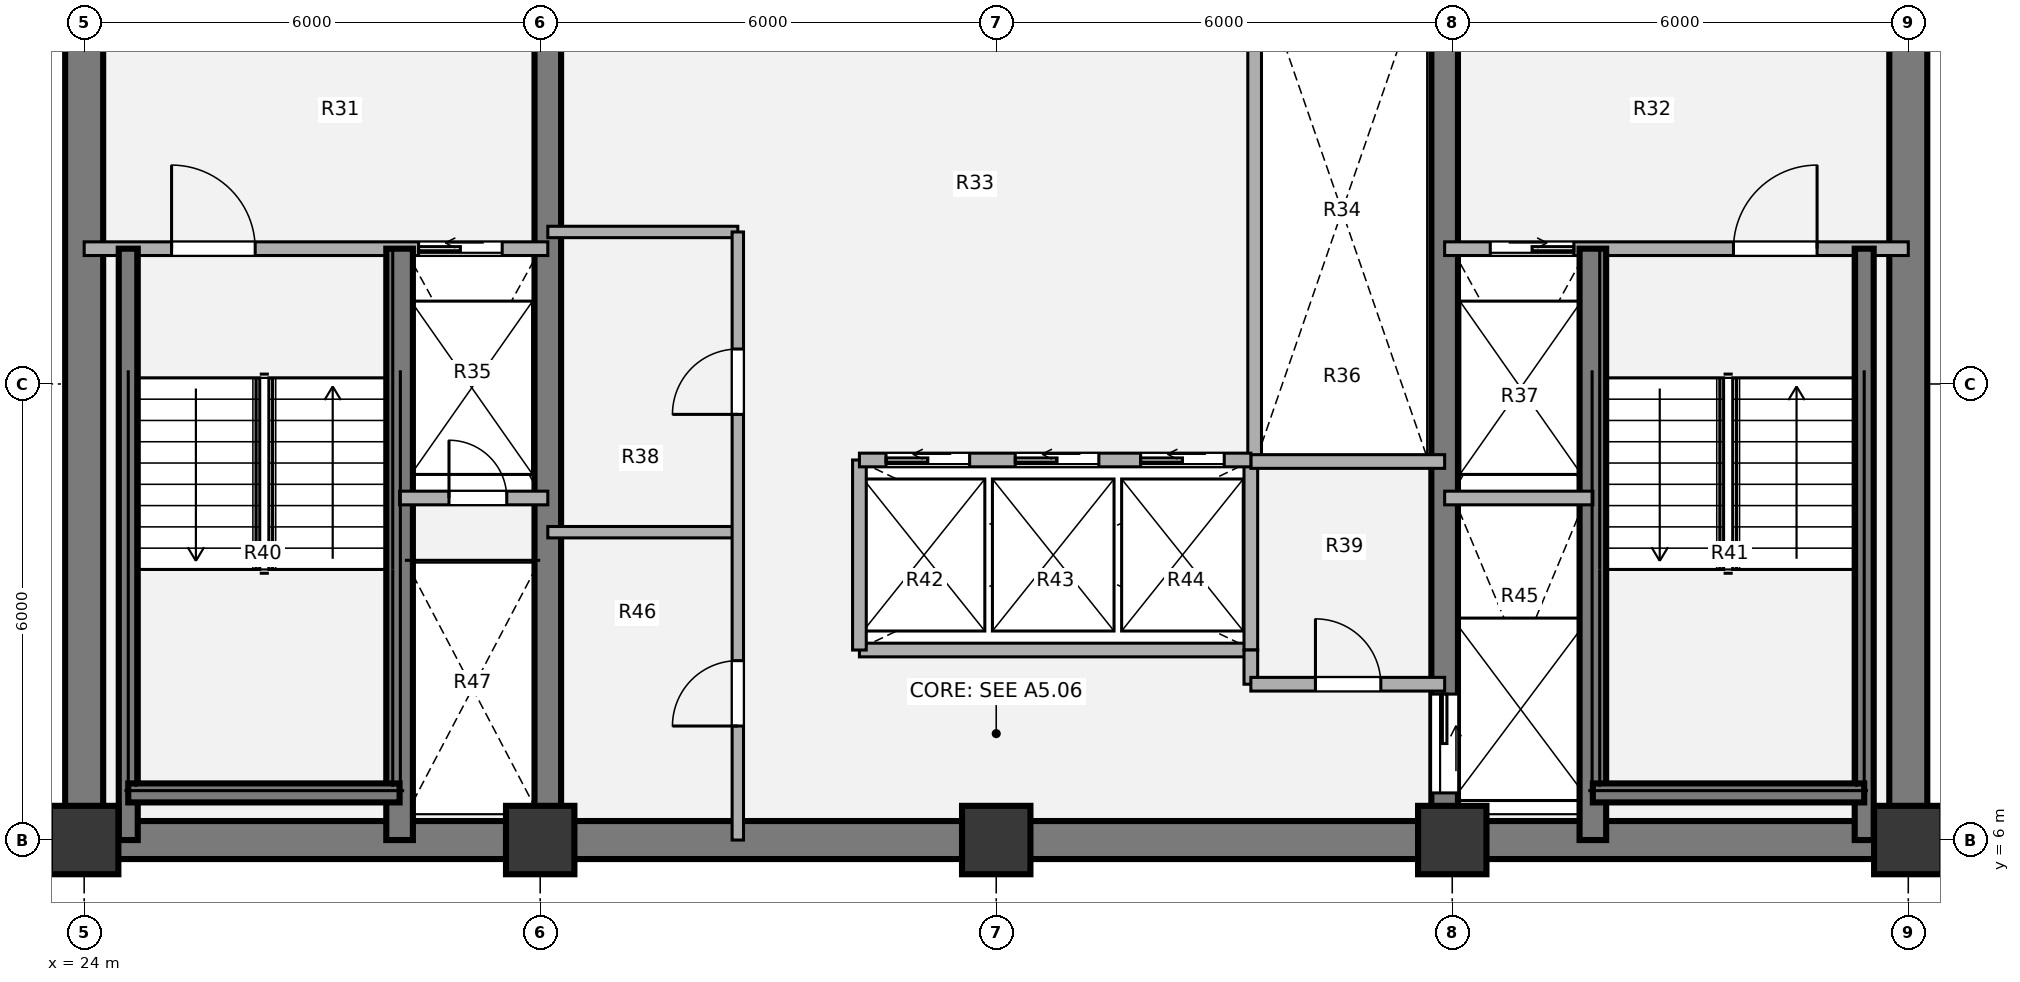
"""IFC4 building model, lengths in metres.
Left out: names, types, materials, properties, quantities, classifications, styles, units other than length and angle.
Written with IfcOpenShell. Run it as: python <this file> out.ifc"""

import sys

from ifc_helpers import new_model, si_unit, direction, frame, frame_2d, origin, origin_2d, place, context, subcontext, project, spatial, rectangle, extrude, source, transform, mapped, element, fill, save


model = new_model("IFC4")
c1 = context("Model", 3, precision=1e-05, world=origin(), true_north=direction((0.0, 1.0)))
c2 = subcontext(c1, "Body", "Model", "MODEL_VIEW")
j1 = project(units=[si_unit("LENGTHUNIT", "METRE"), si_unit("PLANEANGLEUNIT", "RADIAN")], contexts=[c1])
p1 = place(None, origin())
s1 = spatial("IfcSite", under=j1, at=p1, CompositionType="ELEMENT")
p2 = place(p1, origin())
s2 = spatial("IfcBuilding", under=s1, at=p2, CompositionType="ELEMENT")
p3 = place(p2, frame((0.0, 0.0, 131.4)))
s3 = spatial("IfcBuildingStorey", under=s2, at=p3, CompositionType="ELEMENT", Elevation=131.4)
m1 = source(origin(), c2, "Body", "SweptSolid", [
    extrude(rectangle(XDim=0.9, YDim=0.9, at=origin_2d()), origin(), (0.0, 0.0, 1.0), 3.78),
])
for number, where, z_axis, x_axis in (
    (1, (24.0, 6.0, 0.0), (0.0, 0.0, 1.0), (1.0, 0.0, 0.0)),
    (2, (30.0, 6.0, 0.0), (0.0, 0.0, 1.0), (1.0, 0.0, 0.0)),
    (3, (36.0, 6.0, 0.0), (0.0, 0.0, 1.0), (1.0, 0.0, 0.0)),
    (4, (42.0, 6.0, 0.0), (0.0, 0.0, 1.0), (1.0, 0.0, 0.0)),
    (5, (48.0, 6.0, 0.0), (0.0, 0.0, 1.0), (1.0, 0.0, 0.0)),
):
    element("IfcColumn", number, at=place(p3, frame(where, z_axis=z_axis, x_axis=x_axis)), inside=s3, PredefinedType="COLUMN", context=c2, shape_type="MappedRepresentation", body=[
        mapped(m1, transform((0.0, 0.0, 0.0), x_axis=(1.0, 0.0, 0.0), y_axis=(0.0, 1.0, 0.0), z_axis=(0.0, 0.0, 1.0), scale=1.0)),
    ])
p4 = place(p3, frame((48.25, 6.0, 0.0), z_axis=(0.0, 0.0, 1.0), x_axis=(-1.0, 0.0, 0.0)))
e6 = element("IfcWall", 6, at=p4, inside=s3, PredefinedType="SHEAR", context=c2, shape_type="SweptSolid", body=[
    extrude(rectangle(XDim=24.5, YDim=0.5, at=frame_2d((12.25, 0.0))), origin(), (0.0, 0.0, 1.0), 3.78),
])
for number, where, z_axis, x_axis in (
    (7, (24.0, 6.0, 0.0), (0.0, 0.0, 1.0), (0.0, 1.0, 0.0)),
    (8, (48.0, 18.0, 0.0), (0.0, 0.0, 1.0), (0.0, -1.0, 0.0)),
):
    element("IfcWall", number, at=place(p3, frame(where, z_axis=z_axis, x_axis=x_axis)), inside=s3, PredefinedType="SHEAR", context=c2, shape_type="SweptSolid", body=[
        extrude(rectangle(XDim=12.0, YDim=0.5, at=frame_2d((6.0, 0.0))), origin(), (0.0, 0.0, 1.0), 3.78),
    ])
p5 = place(p3, frame((30.1, 6.0, 0.0), z_axis=(0.0, 0.0, 1.0), x_axis=(0.0, 1.0, 0.0)))
e9 = element("IfcWall", 9, at=p5, inside=s3, PredefinedType="SHEAR", context=c2, shape_type="SweptSolid", body=[
    extrude(rectangle(XDim=12.0, YDim=0.35, at=frame_2d((6.0, 0.0))), origin(), (0.0, 0.0, 1.0), 3.78),
])
p6 = place(p3, frame((41.9, 18.0, 0.0), z_axis=(0.0, 0.0, 1.0), x_axis=(0.0, -1.0, 0.0)))
e10 = element("IfcWall", 10, at=p6, inside=s3, PredefinedType="SHEAR", context=c2, shape_type="SweptSolid", body=[
    extrude(rectangle(XDim=12.0, YDim=0.35, at=frame_2d((6.0, 0.0))), origin(), (0.0, 0.0, 1.0), 3.78),
])
p7 = place(p6, frame((10.08, 0.0, 0.0)))
e11 = element("IfcOpeningElement", 11, at=p7, cuts=e10, PredefinedType="OPENING", context=c2, shape_type="SweptSolid", body=[
    extrude(rectangle(XDim=1.3, YDim=2.1, at=origin_2d()), frame((0.65, 0.185, 1.05), z_axis=(0.0, -1.0, 0.0), x_axis=(1.0, 0.0, 0.0)), (0.0, 0.0, 1.0), 0.37),
])
p8 = place(p3, frame((30.1, 14.0, 0.0), z_axis=(0.0, 0.0, 1.0), x_axis=(1.0, 0.0, 0.0)))
e12 = element("IfcWall", 12, at=p8, inside=s3, PredefinedType="PARTITIONING", context=c2, shape_type="SweptSolid", body=[
    extrude(rectangle(XDim=2.5, YDim=0.15, at=frame_2d((1.25, 0.0))), origin(), (0.0, 0.0, 1.0), 3.5),
])
p9 = place(p3, frame((34.2, 8.5, 0.0), z_axis=(0.0, 0.0, 1.0), x_axis=(1.0, 0.0, 0.0)))
e13 = element("IfcWall", 13, at=p9, inside=s3, PredefinedType="PARTITIONING", context=c2, shape_type="SweptSolid", body=[
    extrude(rectangle(XDim=5.15, YDim=0.18, at=frame_2d((2.575, 0.0))), origin(), (0.0, 0.0, 1.0), 3.5),
])
for number, where, z_axis, x_axis in (
    (14, (34.2, 8.5, 0.0), (0.0, 0.0, 1.0), (0.0, 1.0, 0.0)),
    (15, (39.35, 8.5, 0.0), (0.0, 0.0, 1.0), (0.0, 1.0, 0.0)),
):
    element("IfcWall", number, at=place(p3, frame(where, z_axis=z_axis, x_axis=x_axis)), inside=s3, PredefinedType="PARTITIONING", context=c2, shape_type="SweptSolid", body=[
        extrude(rectangle(XDim=2.5, YDim=0.18, at=frame_2d((1.25, 0.0))), origin(), (0.0, 0.0, 1.0), 3.5),
    ])
p10 = place(p3, frame((39.4, 11.0, 0.0), z_axis=(0.0, 0.0, 1.0), x_axis=(0.0, 1.0, 0.0)))
e16 = element("IfcWall", 16, at=p10, inside=s3, PredefinedType="PARTITIONING", context=c2, shape_type="SweptSolid", body=[
    extrude(rectangle(XDim=7.0, YDim=0.18, at=frame_2d((3.5, 0.0))), origin(), (0.0, 0.0, 1.0), 3.5),
])
p11 = place(p3, frame((30.1, 10.05, 0.0), z_axis=(0.0, 0.0, 1.0), x_axis=(1.0, 0.0, 0.0)))
e17 = element("IfcWall", 17, at=p11, inside=s3, PredefinedType="PARTITIONING", context=c2, shape_type="SweptSolid", body=[
    extrude(rectangle(XDim=2.5, YDim=0.15, at=frame_2d((1.25, 0.0))), origin(), (0.0, 0.0, 1.0), 3.5),
])
p12 = place(p3, frame((32.6, 6.0, 0.0), z_axis=(0.0, 0.0, 1.0), x_axis=(0.0, 1.0, 0.0)))
e18 = element("IfcWall", 18, at=p12, inside=s3, PredefinedType="PARTITIONING", context=c2, shape_type="SweptSolid", body=[
    extrude(rectangle(XDim=8.0, YDim=0.15, at=frame_2d((4.0, 0.0))), origin(), (0.0, 0.0, 1.0), 3.5),
])
p13 = place(p12, frame((1.5, 0.0, 0.0)))
e19 = element("IfcOpeningElement", 19, at=p13, cuts=e18, PredefinedType="OPENING", context=c2, shape_type="SweptSolid", body=[
    extrude(rectangle(XDim=0.86, YDim=2.1, at=origin_2d()), frame((0.43, 0.085, 1.05), z_axis=(0.0, -1.0, 0.0), x_axis=(1.0, 0.0, 0.0)), (0.0, 0.0, 1.0), 0.17),
])
p14 = place(p12, frame((5.6, 0.0, 0.0)))
e20 = element("IfcOpeningElement", 20, at=p14, cuts=e18, PredefinedType="OPENING", context=c2, shape_type="SweptSolid", body=[
    extrude(rectangle(XDim=0.86, YDim=2.1, at=origin_2d()), frame((0.43, 0.085, 1.05), z_axis=(0.0, -1.0, 0.0), x_axis=(1.0, 0.0, 0.0)), (0.0, 0.0, 1.0), 0.17),
])
p15 = place(p3, frame((39.35, 10.98, 0.0), z_axis=(0.0, 0.0, 1.0), x_axis=(1.0, 0.0, 0.0)))
e21 = element("IfcWall", 21, at=p15, inside=s3, PredefinedType="PARTITIONING", context=c2, shape_type="SweptSolid", body=[
    extrude(rectangle(XDim=2.55, YDim=0.18, at=frame_2d((1.275, 0.0))), origin(), (0.0, 0.0, 1.0), 3.5),
])
p16 = place(p3, frame((39.35, 8.05, 0.0), z_axis=(0.0, 0.0, 1.0), x_axis=(0.0, 1.0, 0.0)))
e22 = element("IfcWall", 22, at=p16, inside=s3, PredefinedType="PARTITIONING", context=c2, shape_type="SweptSolid", body=[
    extrude(rectangle(XDim=0.45, YDim=0.18, at=frame_2d((0.225, 0.0))), origin(), (0.0, 0.0, 1.0), 3.5),
])
p17 = place(p3, frame((39.35, 8.05, 0.0), z_axis=(0.0, 0.0, 1.0), x_axis=(1.0, 0.0, 0.0)))
e23 = element("IfcWall", 23, at=p17, inside=s3, PredefinedType="PARTITIONING", context=c2, shape_type="SweptSolid", body=[
    extrude(rectangle(XDim=2.55, YDim=0.18, at=frame_2d((1.275, 0.0))), origin(), (0.0, 0.0, 1.0), 3.5),
])
p18 = place(p17, frame((0.85, 0.0, 0.0)))
e24 = element("IfcOpeningElement", 24, at=p18, cuts=e23, PredefinedType="OPENING", context=c2, shape_type="SweptSolid", body=[
    extrude(rectangle(XDim=0.86, YDim=2.1, at=origin_2d()), frame((0.43, 0.1, 1.05), z_axis=(0.0, -1.0, 0.0), x_axis=(1.0, 0.0, 0.0)), (0.0, 0.0, 1.0), 0.2),
])
p19 = place(p3, frame((24.0, 13.78, 0.0), z_axis=(0.0, 0.0, 1.0), x_axis=(1.0, 0.0, 0.0)))
e25 = element("IfcWall", 25, at=p19, inside=s3, PredefinedType="PARTITIONING", context=c2, shape_type="SweptSolid", body=[
    extrude(rectangle(XDim=6.1, YDim=0.18, at=frame_2d((3.05, 0.0))), origin(), (0.0, 0.0, 1.0), 3.5),
])
p20 = place(p19, frame((1.15, 0.0, 0.0)))
e26 = element("IfcOpeningElement", 26, at=p20, cuts=e25, PredefinedType="OPENING", context=c2, shape_type="SweptSolid", body=[
    extrude(rectangle(XDim=1.1, YDim=2.1, at=origin_2d()), frame((0.55, 0.1, 1.05), z_axis=(0.0, -1.0, 0.0), x_axis=(1.0, 0.0, 0.0)), (0.0, 0.0, 1.0), 0.2),
])
p21 = place(p19, frame((4.4, 0.0, 0.0)))
e27 = element("IfcOpeningElement", 27, at=p21, cuts=e25, PredefinedType="OPENING", context=c2, shape_type="SweptSolid", body=[
    extrude(rectangle(XDim=1.1, YDim=2.1, at=origin_2d()), frame((0.55, 0.1, 1.05), z_axis=(0.0, -1.0, 0.0), x_axis=(1.0, 0.0, 0.0)), (0.0, 0.0, 1.0), 0.2),
])
p22 = place(p3, frame((28.15, 6.0, 0.0), z_axis=(0.0, 0.0, 1.0), x_axis=(0.0, 1.0, 0.0)))
e28 = element("IfcWall", 28, at=p22, inside=s3, PredefinedType="SHEAR", context=c2, shape_type="SweptSolid", body=[
    extrude(rectangle(XDim=7.78, YDim=0.35, at=frame_2d((3.89, 0.0))), origin(), (0.0, 0.0, 1.0), 3.85),
])
p23 = place(p3, frame((24.58, 6.0, 0.0), z_axis=(0.0, 0.0, 1.0), x_axis=(0.0, 1.0, 0.0)))
e29 = element("IfcWall", 29, at=p23, inside=s3, PredefinedType="SHEAR", context=c2, shape_type="SweptSolid", body=[
    extrude(rectangle(XDim=7.78, YDim=0.25, at=frame_2d((3.89, 0.0))), origin(), (0.0, 0.0, 1.0), 3.85),
])
p24 = place(p3, frame((24.58, 6.62, 0.0), z_axis=(0.0, 0.0, 1.0), x_axis=(1.0, 0.0, 0.0)))
e30 = element("IfcWall", 30, at=p24, inside=s3, PredefinedType="SHEAR", context=c2, shape_type="SweptSolid", body=[
    extrude(rectangle(XDim=3.57, YDim=0.25, at=frame_2d((1.785, 0.0))), origin(), (0.0, 0.0, 1.0), 3.85),
])
p25 = place(p3, frame((28.15, 10.5, 0.0), z_axis=(0.0, 0.0, 1.0), x_axis=(1.0, 0.0, 0.0)))
e31 = element("IfcWall", 31, at=p25, inside=s3, PredefinedType="PARTITIONING", context=c2, shape_type="SweptSolid", body=[
    extrude(rectangle(XDim=1.95, YDim=0.18, at=frame_2d((0.975, 0.0))), origin(), (0.0, 0.0, 1.0), 3.5),
])
p26 = place(p25, frame((0.65, 0.0, 0.0)))
e32 = element("IfcOpeningElement", 32, at=p26, cuts=e31, PredefinedType="OPENING", context=c2, shape_type="SweptSolid", body=[
    extrude(rectangle(XDim=0.76, YDim=2.05, at=origin_2d()), frame((0.38, 0.1, 1.025), z_axis=(0.0, -1.0, 0.0), x_axis=(1.0, 0.0, 0.0)), (0.0, 0.0, 1.0), 0.2),
])
p27 = place(p3, frame((41.9, 13.78, 0.0), z_axis=(0.0, 0.0, 1.0), x_axis=(1.0, 0.0, 0.0)))
e33 = element("IfcWall", 33, at=p27, inside=s3, PredefinedType="PARTITIONING", context=c2, shape_type="SweptSolid", body=[
    extrude(rectangle(XDim=6.1, YDim=0.18, at=frame_2d((3.05, 0.0))), origin(), (0.0, 0.0, 1.0), 3.5),
])
p28 = place(p27, frame((0.6, 0.0, 0.0)))
e34 = element("IfcOpeningElement", 34, at=p28, cuts=e33, PredefinedType="OPENING", context=c2, shape_type="SweptSolid", body=[
    extrude(rectangle(XDim=1.1, YDim=2.1, at=origin_2d()), frame((0.55, 0.1, 1.05), z_axis=(0.0, -1.0, 0.0), x_axis=(1.0, 0.0, 0.0)), (0.0, 0.0, 1.0), 0.2),
])
p29 = place(p27, frame((3.8, 0.0, 0.0)))
e35 = element("IfcOpeningElement", 35, at=p29, cuts=e33, PredefinedType="OPENING", context=c2, shape_type="SweptSolid", body=[
    extrude(rectangle(XDim=1.1, YDim=2.1, at=origin_2d()), frame((0.55, 0.1, 1.05), z_axis=(0.0, -1.0, 0.0), x_axis=(1.0, 0.0, 0.0)), (0.0, 0.0, 1.0), 0.2),
])
p30 = place(p3, frame((43.85, 6.0, 0.0), z_axis=(0.0, 0.0, 1.0), x_axis=(0.0, 1.0, 0.0)))
e36 = element("IfcWall", 36, at=p30, inside=s3, PredefinedType="SHEAR", context=c2, shape_type="SweptSolid", body=[
    extrude(rectangle(XDim=7.78, YDim=0.35, at=frame_2d((3.89, 0.0))), origin(), (0.0, 0.0, 1.0), 3.85),
])
p31 = place(p3, frame((47.42, 6.0, 0.0), z_axis=(0.0, 0.0, 1.0), x_axis=(0.0, 1.0, 0.0)))
e37 = element("IfcWall", 37, at=p31, inside=s3, PredefinedType="SHEAR", context=c2, shape_type="SweptSolid", body=[
    extrude(rectangle(XDim=7.78, YDim=0.25, at=frame_2d((3.89, 0.0))), origin(), (0.0, 0.0, 1.0), 3.85),
])
p32 = place(p3, frame((43.85, 6.62, 0.0), z_axis=(0.0, 0.0, 1.0), x_axis=(1.0, 0.0, 0.0)))
e38 = element("IfcWall", 38, at=p32, inside=s3, PredefinedType="SHEAR", context=c2, shape_type="SweptSolid", body=[
    extrude(rectangle(XDim=3.57, YDim=0.25, at=frame_2d((1.785, 0.0))), origin(), (0.0, 0.0, 1.0), 3.85),
])
p33 = place(p3, frame((41.9, 10.5, 0.0), z_axis=(0.0, 0.0, 1.0), x_axis=(1.0, 0.0, 0.0)))
e39 = element("IfcWall", 39, at=p33, inside=s3, PredefinedType="PARTITIONING", context=c2, shape_type="SweptSolid", body=[
    extrude(rectangle(XDim=1.95, YDim=0.18, at=frame_2d((0.975, 0.0))), origin(), (0.0, 0.0, 1.0), 3.5),
])
p34 = place(p3, frame((34.2, 11.0, 0.0), z_axis=(0.0, 0.0, 1.0), x_axis=(1.0, 0.0, 0.0)))
e40 = element("IfcWall", 40, at=p34, inside=s3, PredefinedType="PARTITIONING", context=c2, shape_type="SweptSolid", body=[
    extrude(rectangle(XDim=5.15, YDim=0.18, at=frame_2d((2.575, 0.0))), origin(), (0.0, 0.0, 1.0), 3.5),
])
p35 = place(p34, frame((0.35, 0.0, 0.0)))
e41 = element("IfcOpeningElement", 41, at=p35, cuts=e40, PredefinedType="OPENING", context=c2, shape_type="SweptSolid", body=[
    extrude(rectangle(XDim=1.1, YDim=2.1, at=origin_2d()), frame((0.55, 0.1, 1.05), z_axis=(0.0, -1.0, 0.0), x_axis=(1.0, 0.0, 0.0)), (0.0, 0.0, 1.0), 0.2),
])
p36 = place(p34, frame((2.05, 0.0, 0.0)))
e42 = element("IfcOpeningElement", 42, at=p36, cuts=e40, PredefinedType="OPENING", context=c2, shape_type="SweptSolid", body=[
    extrude(rectangle(XDim=1.1, YDim=2.1, at=origin_2d()), frame((0.55, 0.1, 1.05), z_axis=(0.0, -1.0, 0.0), x_axis=(1.0, 0.0, 0.0)), (0.0, 0.0, 1.0), 0.2),
])
p37 = place(p34, frame((3.7, 0.0, 0.0)))
e43 = element("IfcOpeningElement", 43, at=p37, cuts=e40, PredefinedType="OPENING", context=c2, shape_type="SweptSolid", body=[
    extrude(rectangle(XDim=1.1, YDim=2.1, at=origin_2d()), frame((0.55, 0.1, 1.05), z_axis=(0.0, -1.0, 0.0), x_axis=(1.0, 0.0, 0.0)), (0.0, 0.0, 1.0), 0.2),
])
m2 = source(origin(), c2, "Body", "SweptSolid", [
    extrude(rectangle(XDim=0.86, YDim=2.1, at=origin_2d()), frame((0.43, 0.025, 1.05), z_axis=(0.0, -1.0, 0.0), x_axis=(1.0, 0.0, 0.0)), (0.0, 0.0, 1.0), 0.05),
])
p38 = place(p13, origin())
e44 = element("IfcDoor", 44, at=p38, inside=s3, OperationType="SINGLE_SWING_LEFT", PredefinedType="DOOR", context=c2, shape_type="MappedRepresentation", body=[
    mapped(m2, transform((0.0, 0.0, 0.0), x_axis=(1.0, 0.0, 0.0), y_axis=(0.0, 1.0, 0.0), z_axis=(0.0, 0.0, 1.0), scale=1.0)),
])
fill(e19, e44)
p39 = place(p14, origin())
e45 = element("IfcDoor", 45, at=p39, inside=s3, OperationType="SINGLE_SWING_LEFT", PredefinedType="DOOR", context=c2, shape_type="MappedRepresentation", body=[
    mapped(m2, transform((0.0, 0.0, 0.0), x_axis=(1.0, 0.0, 0.0), y_axis=(0.0, 1.0, 0.0), z_axis=(0.0, 0.0, 1.0), scale=1.0)),
])
fill(e20, e45)
p40 = place(p18, origin())
e46 = element("IfcDoor", 46, at=p40, inside=s3, OperationType="SINGLE_SWING_LEFT", PredefinedType="DOOR", context=c2, shape_type="MappedRepresentation", body=[
    mapped(m2, transform((0.0, 0.0, 0.0), x_axis=(1.0, 0.0, 0.0), y_axis=(0.0, 1.0, 0.0), z_axis=(0.0, 0.0, 1.0), scale=1.0)),
])
fill(e24, e46)
m3 = source(origin(), c2, "Body", "SweptSolid", [
    extrude(rectangle(XDim=1.1, YDim=2.1, at=origin_2d()), frame((0.55, 0.025, 1.05), z_axis=(0.0, -1.0, 0.0), x_axis=(1.0, 0.0, 0.0)), (0.0, 0.0, 1.0), 0.05),
])
p41 = place(p20, origin())
e47 = element("IfcDoor", 47, at=p41, inside=s3, OperationType="SINGLE_SWING_LEFT", PredefinedType="DOOR", context=c2, shape_type="MappedRepresentation", body=[
    mapped(m3, transform((0.0, 0.0, 0.0), x_axis=(1.0, 0.0, 0.0), y_axis=(0.0, 1.0, 0.0), z_axis=(0.0, 0.0, 1.0), scale=1.0)),
])
fill(e26, e47)
m4 = source(origin(), c2, "Body", "SweptSolid", [
    extrude(rectangle(XDim=1.1, YDim=2.1, at=origin_2d()), frame((0.55, 0.025, 1.05), z_axis=(0.0, -1.0, 0.0), x_axis=(1.0, 0.0, 0.0)), (0.0, 0.0, 1.0), 0.05),
])
p42 = place(p21, origin())
e48 = element("IfcDoor", 48, at=p42, inside=s3, OperationType="SLIDING_TO_LEFT", PredefinedType="DOOR", context=c2, shape_type="MappedRepresentation", body=[
    mapped(m4, transform((0.0, 0.0, 0.0), x_axis=(1.0, 0.0, 0.0), y_axis=(0.0, 1.0, 0.0), z_axis=(0.0, 0.0, 1.0), scale=1.0)),
])
fill(e27, e48)
m5 = source(origin(), c2, "Body", "SweptSolid", [
    extrude(rectangle(XDim=0.76, YDim=2.05, at=origin_2d()), frame((0.38, 0.025, 1.025), z_axis=(0.0, -1.0, 0.0), x_axis=(1.0, 0.0, 0.0)), (0.0, 0.0, 1.0), 0.05),
])
p43 = place(p26, origin())
e49 = element("IfcDoor", 49, at=p43, inside=s3, OperationType="SINGLE_SWING_LEFT", PredefinedType="DOOR", context=c2, shape_type="MappedRepresentation", body=[
    mapped(m5, transform((0.0, 0.0, 0.0), x_axis=(1.0, 0.0, 0.0), y_axis=(0.0, 1.0, 0.0), z_axis=(0.0, 0.0, 1.0), scale=1.0)),
])
fill(e32, e49)
p44 = place(p28, origin())
e50 = element("IfcDoor", 50, at=p44, inside=s3, OperationType="SLIDING_TO_RIGHT", PredefinedType="DOOR", context=c2, shape_type="MappedRepresentation", body=[
    mapped(m4, transform((0.0, 0.0, 0.0), x_axis=(1.0, 0.0, 0.0), y_axis=(0.0, 1.0, 0.0), z_axis=(0.0, 0.0, 1.0), scale=1.0)),
])
fill(e34, e50)
p45 = place(p29, origin())
e51 = element("IfcDoor", 51, at=p45, inside=s3, OperationType="SINGLE_SWING_RIGHT", PredefinedType="DOOR", context=c2, shape_type="MappedRepresentation", body=[
    mapped(m3, transform((0.0, 0.0, 0.0), x_axis=(1.0, 0.0, 0.0), y_axis=(0.0, 1.0, 0.0), z_axis=(0.0, 0.0, 1.0), scale=1.0)),
])
fill(e35, e51)
m6 = source(origin(), c2, "Body", "SweptSolid", [
    extrude(rectangle(XDim=1.3, YDim=2.1, at=origin_2d()), frame((0.65, 0.025, 1.05), z_axis=(0.0, -1.0, 0.0), x_axis=(1.0, 0.0, 0.0)), (0.0, 0.0, 1.0), 0.05),
])
p46 = place(p7, origin())
e52 = element("IfcDoor", 52, at=p46, inside=s3, OperationType="SLIDING_TO_LEFT", PredefinedType="DOOR", context=c2, shape_type="MappedRepresentation", body=[
    mapped(m6, transform((0.0, 0.0, 0.0), x_axis=(1.0, 0.0, 0.0), y_axis=(0.0, 1.0, 0.0), z_axis=(0.0, 0.0, 1.0), scale=1.0)),
])
fill(e11, e52)
p47 = place(p35, origin())
e53 = element("IfcDoor", 53, at=p47, inside=s3, OperationType="SLIDING_TO_LEFT", PredefinedType="DOOR", context=c2, shape_type="MappedRepresentation", body=[
    mapped(m4, transform((0.0, 0.0, 0.0), x_axis=(1.0, 0.0, 0.0), y_axis=(0.0, 1.0, 0.0), z_axis=(0.0, 0.0, 1.0), scale=1.0)),
])
fill(e41, e53)
p48 = place(p36, origin())
e54 = element("IfcDoor", 54, at=p48, inside=s3, OperationType="SLIDING_TO_LEFT", PredefinedType="DOOR", context=c2, shape_type="MappedRepresentation", body=[
    mapped(m4, transform((0.0, 0.0, 0.0), x_axis=(1.0, 0.0, 0.0), y_axis=(0.0, 1.0, 0.0), z_axis=(0.0, 0.0, 1.0), scale=1.0)),
])
fill(e42, e54)
p49 = place(p37, origin())
e55 = element("IfcDoor", 55, at=p49, inside=s3, OperationType="SLIDING_TO_LEFT", PredefinedType="DOOR", context=c2, shape_type="MappedRepresentation", body=[
    mapped(m4, transform((0.0, 0.0, 0.0), x_axis=(1.0, 0.0, 0.0), y_axis=(0.0, 1.0, 0.0), z_axis=(0.0, 0.0, 1.0), scale=1.0)),
])
fill(e43, e55)
save(model, sys.argv[1])
